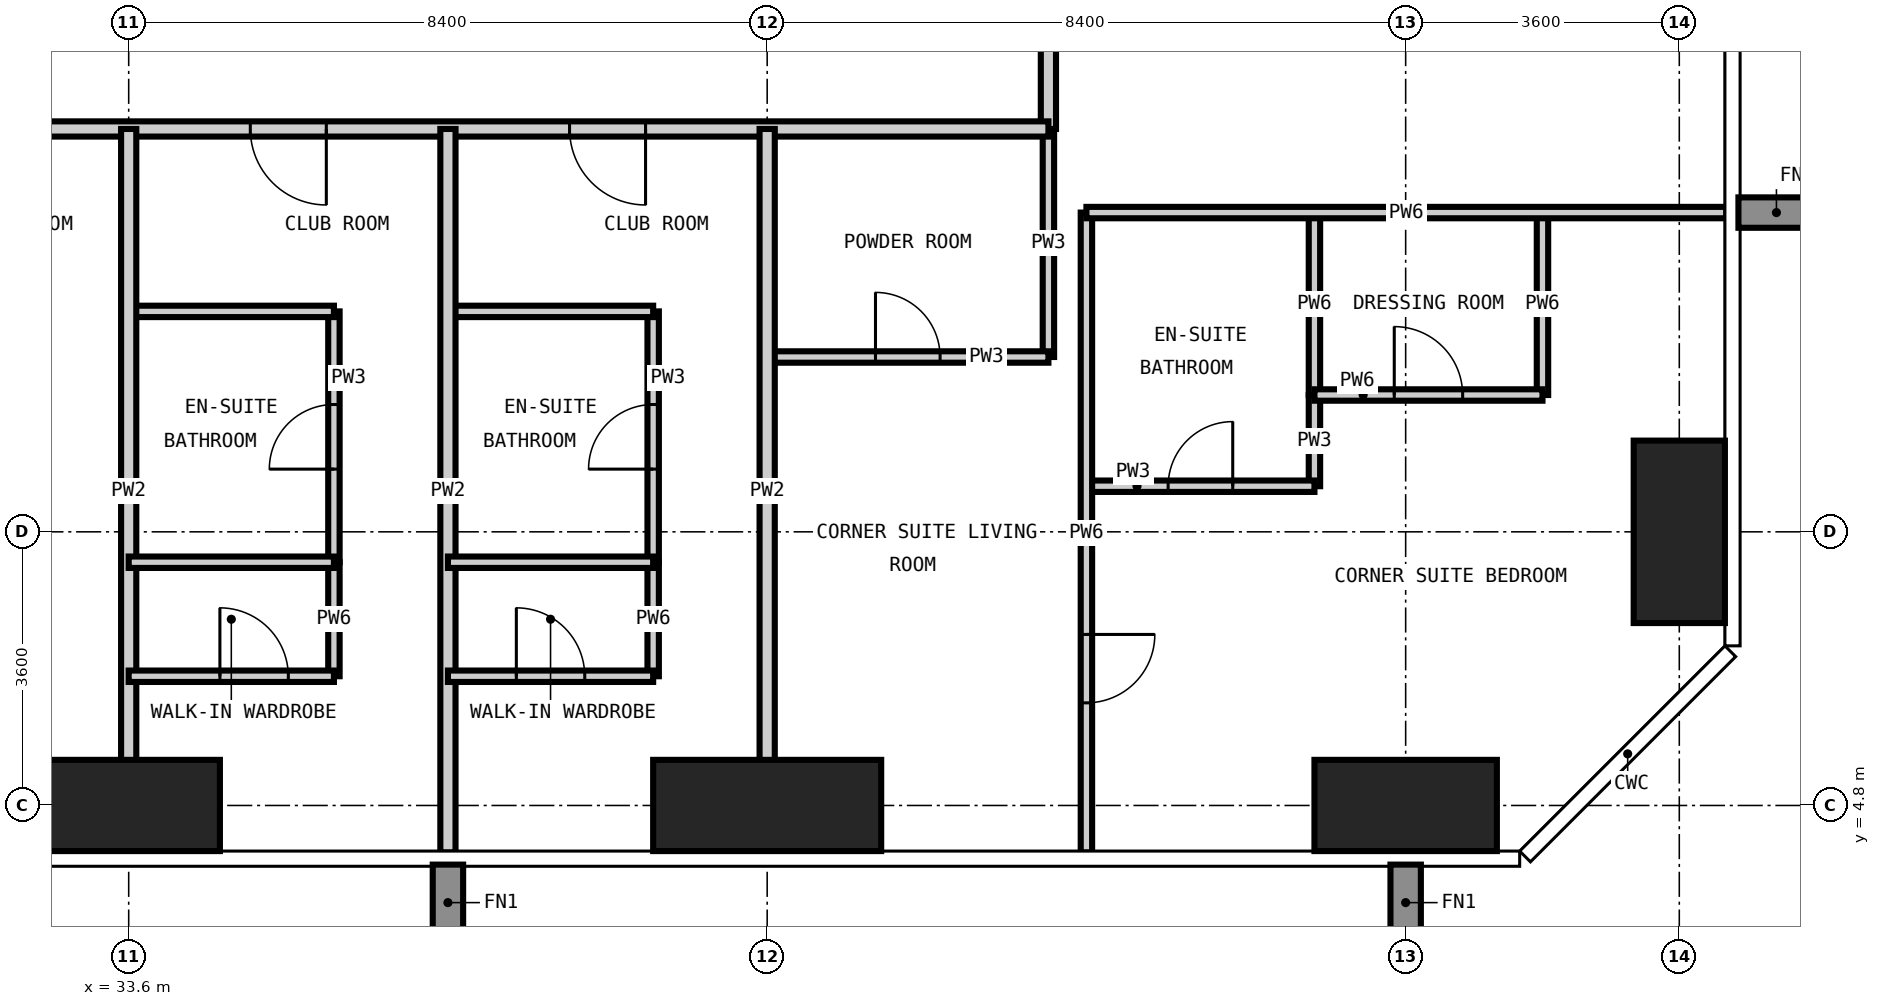
"""IFC4 building model, lengths in metres.
Left out: names, types, materials, properties, quantities, classifications, styles, units other than length and angle.
Written with IfcOpenShell. Run it as: python <this file> out.ifc"""

import sys

from ifc_helpers import new_model, si_unit, direction, frame, frame_2d, origin, origin_2d, place, context, subcontext, project, spatial, rectangle, extrude, element, fill, save


model = new_model("IFC4")
c1 = context("Model", 3, precision=1e-05, world=origin(), true_north=direction((0.0, 1.0)))
c2 = subcontext(c1, "Body", "Model", "MODEL_VIEW")
j1 = project(units=[si_unit("LENGTHUNIT", "METRE"), si_unit("PLANEANGLEUNIT", "RADIAN")], contexts=[c1])
p1 = place(None, origin())
s1 = spatial("IfcSite", under=j1, at=p1, CompositionType="ELEMENT")
p2 = place(p1, origin())
s2 = spatial("IfcBuilding", under=s1, at=p2, CompositionType="ELEMENT")
p3 = place(p2, frame((0.0, 0.0, 213.0)))
s3 = spatial("IfcBuildingStorey", under=s2, at=p3, CompositionType="ELEMENT", Elevation=213.0)
p4 = place(p3, frame((33.6, 4.8, -0.35), z_axis=(0.0, 0.0, 1.0), x_axis=(1.0, 0.0, 0.0)))
e1 = element("IfcColumn", 1, at=p4, inside=s3, PredefinedType="COLUMN", context=c2, shape_type="SweptSolid", body=[
    extrude(rectangle(XDim=2.4, YDim=1.2, at=origin_2d()), origin(), (0.0, 0.0, 1.0), 3.6),
])
p5 = place(p3, frame((42.0, 4.8, -0.35), z_axis=(0.0, 0.0, 1.0), x_axis=(1.0, 0.0, 0.0)))
e2 = element("IfcColumn", 2, at=p5, inside=s3, PredefinedType="COLUMN", context=c2, shape_type="SweptSolid", body=[
    extrude(rectangle(XDim=3.0, YDim=1.2, at=origin_2d()), origin(), (0.0, 0.0, 1.0), 3.6),
])
p6 = place(p3, frame((50.4, 4.8, -0.35), z_axis=(0.0, 0.0, 1.0), x_axis=(1.0, 0.0, 0.0)))
e3 = element("IfcColumn", 3, at=p6, inside=s3, PredefinedType="COLUMN", context=c2, shape_type="SweptSolid", body=[
    extrude(rectangle(XDim=2.4, YDim=1.2, at=origin_2d()), origin(), (0.0, 0.0, 1.0), 3.6),
])
p7 = place(p3, frame((54.0, 8.4, -0.35), z_axis=(0.0, 0.0, 1.0), x_axis=(1.0, 0.0, 0.0)))
e4 = element("IfcColumn", 4, at=p7, inside=s3, PredefinedType="COLUMN", context=c2, shape_type="SweptSolid", body=[
    extrude(rectangle(XDim=1.2, YDim=2.4, at=origin_2d()), origin(), (0.0, 0.0, 1.0), 3.6),
])
p8 = place(p3, frame((36.3, 8.0, 0.0), z_axis=(0.0, 0.0, 1.0), x_axis=(0.0, 1.0, 0.0)))
e5 = element("IfcWall", 5, at=p8, inside=s3, PredefinedType="PARTITIONING", context=c2, shape_type="SweptSolid", body=[
    extrude(rectangle(XDim=3.3, YDim=0.15, at=frame_2d((1.65, 0.0))), origin(), (0.0, 0.0, 1.0), 3.25),
])
p9 = place(p8, frame((1.225, 0.0, 0.0)))
e6 = element("IfcOpeningElement", 6, at=p9, cuts=e5, PredefinedType="OPENING", context=c2, shape_type="SweptSolid", body=[
    extrude(rectangle(XDim=0.85, YDim=2.1, at=frame_2d((0.425, 1.05))), frame((0.0, 0.085, 0.0), z_axis=(0.0, -1.0, 0.0), x_axis=(1.0, 0.0, 0.0)), (0.0, 0.0, 1.0), 0.17),
])
p10 = place(p3, frame((40.5, 8.0, 0.0), z_axis=(0.0, 0.0, 1.0), x_axis=(0.0, 1.0, 0.0)))
e7 = element("IfcWall", 7, at=p10, inside=s3, PredefinedType="PARTITIONING", context=c2, shape_type="SweptSolid", body=[
    extrude(rectangle(XDim=3.3, YDim=0.15, at=frame_2d((1.65, 0.0))), origin(), (0.0, 0.0, 1.0), 3.25),
])
p11 = place(p10, frame((1.225, 0.0, 0.0)))
e8 = element("IfcOpeningElement", 8, at=p11, cuts=e7, PredefinedType="OPENING", context=c2, shape_type="SweptSolid", body=[
    extrude(rectangle(XDim=0.85, YDim=2.1, at=frame_2d((0.425, 1.05))), frame((0.0, 0.085, 0.0), z_axis=(0.0, -1.0, 0.0), x_axis=(1.0, 0.0, 0.0)), (0.0, 0.0, 1.0), 0.17),
])
p12 = place(p3, frame((45.7, 10.7, 0.0), z_axis=(0.0, 0.0, 1.0), x_axis=(0.0, 1.0, 0.0)))
e9 = element("IfcWall", 9, at=p12, inside=s3, PredefinedType="PARTITIONING", context=c2, shape_type="SweptSolid", body=[
    extrude(rectangle(XDim=3.0, YDim=0.15, at=frame_2d((1.5, 0.0))), origin(), (0.0, 0.0, 1.0), 3.25),
])
p13 = place(p3, frame((49.2, 9.0, 0.0), z_axis=(0.0, 0.0, 1.0), x_axis=(0.0, 1.0, 0.0)))
e10 = element("IfcWall", 10, at=p13, inside=s3, PredefinedType="PARTITIONING", context=c2, shape_type="SweptSolid", body=[
    extrude(rectangle(XDim=1.2, YDim=0.15, at=frame_2d((0.6, 0.0))), origin(), (0.0, 0.0, 1.0), 3.25),
])
p14 = place(p3, frame((46.2, 9.0, 0.0), z_axis=(0.0, 0.0, 1.0), x_axis=(1.0, 0.0, 0.0)))
e11 = element("IfcWall", 11, at=p14, inside=s3, PredefinedType="PARTITIONING", context=c2, shape_type="SweptSolid", body=[
    extrude(rectangle(XDim=3.0, YDim=0.15, at=frame_2d((1.5, 0.0))), origin(), (0.0, 0.0, 1.0), 3.25),
])
p15 = place(p14, frame((1.075, 0.0, 0.0)))
e12 = element("IfcOpeningElement", 12, at=p15, cuts=e11, PredefinedType="OPENING", context=c2, shape_type="SweptSolid", body=[
    extrude(rectangle(XDim=0.85, YDim=2.1, at=frame_2d((0.425, 1.05))), frame((0.0, 0.085, 0.0), z_axis=(0.0, -1.0, 0.0), x_axis=(1.0, 0.0, 0.0)), (0.0, 0.0, 1.0), 0.17),
])
p16 = place(p3, frame((42.0, 10.7, 0.0), z_axis=(0.0, 0.0, 1.0), x_axis=(1.0, 0.0, 0.0)))
e13 = element("IfcWall", 13, at=p16, inside=s3, PredefinedType="PARTITIONING", context=c2, shape_type="SweptSolid", body=[
    extrude(rectangle(XDim=3.7, YDim=0.15, at=frame_2d((1.85, 0.0))), origin(), (0.0, 0.0, 1.0), 3.25),
])
p17 = place(p16, frame((1.425, 0.0, 0.0)))
e14 = element("IfcOpeningElement", 14, at=p17, cuts=e13, PredefinedType="OPENING", context=c2, shape_type="SweptSolid", body=[
    extrude(rectangle(XDim=0.85, YDim=2.1, at=frame_2d((0.425, 1.05))), frame((0.0, 0.085, 0.0), z_axis=(0.0, -1.0, 0.0), x_axis=(1.0, 0.0, 0.0)), (0.0, 0.0, 1.0), 0.17),
])
for number, where, z_axis, x_axis in (
    (15, (33.6, 11.3, 0.0), (0.0, 0.0, 1.0), (1.0, 0.0, 0.0)),
    (16, (37.8, 11.3, 0.0), (0.0, 0.0, 1.0), (1.0, 0.0, 0.0)),
):
    element("IfcWall", number, at=place(p3, frame(where, z_axis=z_axis, x_axis=x_axis)), inside=s3, PredefinedType="PARTITIONING", context=c2, shape_type="SweptSolid", body=[
        extrude(rectangle(XDim=2.7, YDim=0.15, at=frame_2d((1.35, 0.0))), origin(), (0.0, 0.0, 1.0), 3.25),
    ])
p18 = place(p3, frame((45.7, 44.5, 0.0), z_axis=(0.0, 0.0, 1.0), x_axis=(0.0, -1.0, 0.0)))
e17 = element("IfcWall", 17, at=p18, inside=s3, PredefinedType="PARTITIONING", context=c2, shape_type="SweptSolid", body=[
    extrude(rectangle(XDim=30.8, YDim=0.2, at=frame_2d((15.4, 0.0))), origin(), (0.0, 0.0, 1.0), 3.25),
])
p19 = place(p18, frame((23.0, 0.0, 0.0)))
e18 = element("IfcOpeningElement", 18, at=p19, cuts=e17, PredefinedType="OPENING", context=c2, shape_type="SweptSolid", body=[
    extrude(rectangle(XDim=1.0, YDim=2.2, at=frame_2d((0.5, 1.1))), frame((0.0, 0.11, 0.0), z_axis=(0.0, -1.0, 0.0), x_axis=(1.0, 0.0, 0.0)), (0.0, 0.0, 1.0), 0.22),
])
p20 = place(p18, frame((14.6, 0.0, 0.0)))
e19 = element("IfcOpeningElement", 19, at=p20, cuts=e17, PredefinedType="OPENING", context=c2, shape_type="SweptSolid", body=[
    extrude(rectangle(XDim=1.0, YDim=2.2, at=frame_2d((0.5, 1.1))), frame((0.0, 0.11, 0.0), z_axis=(0.0, -1.0, 0.0), x_axis=(1.0, 0.0, 0.0)), (0.0, 0.0, 1.0), 0.22),
])
p21 = place(p18, frame((6.2, 0.0, 0.0)))
e20 = element("IfcOpeningElement", 20, at=p21, cuts=e17, PredefinedType="OPENING", context=c2, shape_type="SweptSolid", body=[
    extrude(rectangle(XDim=1.0, YDim=2.2, at=frame_2d((0.5, 1.1))), frame((0.0, 0.11, 0.0), z_axis=(0.0, -1.0, 0.0), x_axis=(1.0, 0.0, 0.0)), (0.0, 0.0, 1.0), 0.22),
])
p22 = place(p18, frame((28.75, 0.0, 0.0)))
e21 = element("IfcOpeningElement", 21, at=p22, cuts=e17, PredefinedType="OPENING", context=c2, shape_type="SweptSolid", body=[
    extrude(rectangle(XDim=1.0, YDim=2.2, at=frame_2d((0.5, 1.1))), frame((0.0, 0.11, 0.0), z_axis=(0.0, -1.0, 0.0), x_axis=(1.0, 0.0, 0.0)), (0.0, 0.0, 1.0), 0.22),
])
p23 = place(p18, frame((0.75, 0.0, 0.0)))
e22 = element("IfcOpeningElement", 22, at=p23, cuts=e17, PredefinedType="OPENING", context=c2, shape_type="SweptSolid", body=[
    extrude(rectangle(XDim=1.0, YDim=2.2, at=frame_2d((0.5, 1.1))), frame((0.0, 0.11, 0.0), z_axis=(0.0, -1.0, 0.0), x_axis=(1.0, 0.0, 0.0)), (0.0, 0.0, 1.0), 0.22),
])
p24 = place(p3, frame((45.7, 13.7, 0.0), z_axis=(0.0, 0.0, 1.0), x_axis=(-1.0, 0.0, 0.0)))
e23 = element("IfcWall", 23, at=p24, inside=s3, PredefinedType="PARTITIONING", context=c2, shape_type="SweptSolid", body=[
    extrude(rectangle(XDim=32.0, YDim=0.2, at=frame_2d((16.0, 0.0))), origin(), (0.0, 0.0, 1.0), 3.25),
])
p25 = place(p24, frame((26.3, 0.0, 0.0)))
e24 = element("IfcOpeningElement", 24, at=p25, cuts=e23, PredefinedType="OPENING", context=c2, shape_type="SweptSolid", body=[
    extrude(rectangle(XDim=1.0, YDim=2.2, at=frame_2d((0.5, 1.1))), frame((0.0, 0.11, 0.0), z_axis=(0.0, -1.0, 0.0), x_axis=(1.0, 0.0, 0.0)), (0.0, 0.0, 1.0), 0.22),
])
p26 = place(p24, frame((22.1, 0.0, 0.0)))
e25 = element("IfcOpeningElement", 25, at=p26, cuts=e23, PredefinedType="OPENING", context=c2, shape_type="SweptSolid", body=[
    extrude(rectangle(XDim=1.0, YDim=2.2, at=frame_2d((0.5, 1.1))), frame((0.0, 0.11, 0.0), z_axis=(0.0, -1.0, 0.0), x_axis=(1.0, 0.0, 0.0)), (0.0, 0.0, 1.0), 0.22),
])
p27 = place(p24, frame((17.9, 0.0, 0.0)))
e26 = element("IfcOpeningElement", 26, at=p27, cuts=e23, PredefinedType="OPENING", context=c2, shape_type="SweptSolid", body=[
    extrude(rectangle(XDim=1.0, YDim=2.2, at=frame_2d((0.5, 1.1))), frame((0.0, 0.11, 0.0), z_axis=(0.0, -1.0, 0.0), x_axis=(1.0, 0.0, 0.0)), (0.0, 0.0, 1.0), 0.22),
])
p28 = place(p24, frame((13.7, 0.0, 0.0)))
e27 = element("IfcOpeningElement", 27, at=p28, cuts=e23, PredefinedType="OPENING", context=c2, shape_type="SweptSolid", body=[
    extrude(rectangle(XDim=1.0, YDim=2.2, at=frame_2d((0.5, 1.1))), frame((0.0, 0.11, 0.0), z_axis=(0.0, -1.0, 0.0), x_axis=(1.0, 0.0, 0.0)), (0.0, 0.0, 1.0), 0.22),
])
p29 = place(p24, frame((9.5, 0.0, 0.0)))
e28 = element("IfcOpeningElement", 28, at=p29, cuts=e23, PredefinedType="OPENING", context=c2, shape_type="SweptSolid", body=[
    extrude(rectangle(XDim=1.0, YDim=2.2, at=frame_2d((0.5, 1.1))), frame((0.0, 0.11, 0.0), z_axis=(0.0, -1.0, 0.0), x_axis=(1.0, 0.0, 0.0)), (0.0, 0.0, 1.0), 0.22),
])
p30 = place(p24, frame((5.3, 0.0, 0.0)))
e29 = element("IfcOpeningElement", 29, at=p30, cuts=e23, PredefinedType="OPENING", context=c2, shape_type="SweptSolid", body=[
    extrude(rectangle(XDim=1.0, YDim=2.2, at=frame_2d((0.5, 1.1))), frame((0.0, 0.11, 0.0), z_axis=(0.0, -1.0, 0.0), x_axis=(1.0, 0.0, 0.0)), (0.0, 0.0, 1.0), 0.22),
])
for number, where, z_axis, x_axis in (
    (30, (33.6, 4.182, 0.0), (0.0, 0.0, 1.0), (0.0, 1.0, 0.0)),
    (31, (37.8, 4.182, 0.0), (0.0, 0.0, 1.0), (0.0, 1.0, 0.0)),
    (32, (42.0, 4.182, 0.0), (0.0, 0.0, 1.0), (0.0, 1.0, 0.0)),
):
    element("IfcWall", number, at=place(p3, frame(where, z_axis=z_axis, x_axis=x_axis)), inside=s3, PredefinedType="PARTITIONING", context=c2, shape_type="SweptSolid", body=[
        extrude(rectangle(XDim=9.518, YDim=0.2, at=frame_2d((4.759, 0.0))), origin(), (0.0, 0.0, 1.0), 3.25),
    ])
for number, where, z_axis, x_axis in (
    (33, (36.3, 6.5, 0.0), (0.0, 0.0, 1.0), (0.0, 1.0, 0.0)),
    (34, (40.5, 6.5, 0.0), (0.0, 0.0, 1.0), (0.0, 1.0, 0.0)),
):
    element("IfcWall", number, at=place(p3, frame(where, z_axis=z_axis, x_axis=x_axis)), inside=s3, PredefinedType="PARTITIONING", context=c2, shape_type="SweptSolid", body=[
        extrude(rectangle(XDim=1.5, YDim=0.15, at=frame_2d((0.75, 0.0))), origin(), (0.0, 0.0, 1.0), 3.25),
    ])
p31 = place(p3, frame((46.2, 4.182, 0.0), z_axis=(0.0, 0.0, 1.0), x_axis=(0.0, 1.0, 0.0)))
e35 = element("IfcWall", 35, at=p31, inside=s3, PredefinedType="PARTITIONING", context=c2, shape_type="SweptSolid", body=[
    extrude(rectangle(XDim=8.418, YDim=0.15, at=frame_2d((4.209, 0.0))), origin(), (0.0, 0.0, 1.0), 3.25),
])
p32 = place(p31, frame((1.968, 0.0, 0.0)))
e36 = element("IfcOpeningElement", 36, at=p32, cuts=e35, PredefinedType="OPENING", context=c2, shape_type="SweptSolid", body=[
    extrude(rectangle(XDim=0.9, YDim=2.1, at=frame_2d((0.45, 1.05))), frame((0.0, 0.085, 0.0), z_axis=(0.0, -1.0, 0.0), x_axis=(1.0, 0.0, 0.0)), (0.0, 0.0, 1.0), 0.17),
])
for number, where, z_axis, x_axis in (
    (37, (49.2, 10.2, 0.0), (0.0, 0.0, 1.0), (0.0, 1.0, 0.0)),
    (38, (52.2, 10.2, 0.0), (0.0, 0.0, 1.0), (0.0, 1.0, 0.0)),
):
    element("IfcWall", number, at=place(p3, frame(where, z_axis=z_axis, x_axis=x_axis)), inside=s3, PredefinedType="PARTITIONING", context=c2, shape_type="SweptSolid", body=[
        extrude(rectangle(XDim=2.4, YDim=0.15, at=frame_2d((1.2, 0.0))), origin(), (0.0, 0.0, 1.0), 3.25),
    ])
p33 = place(p3, frame((33.6, 6.5, 0.0), z_axis=(0.0, 0.0, 1.0), x_axis=(1.0, 0.0, 0.0)))
e39 = element("IfcWall", 39, at=p33, inside=s3, PredefinedType="PARTITIONING", context=c2, shape_type="SweptSolid", body=[
    extrude(rectangle(XDim=2.7, YDim=0.15, at=frame_2d((1.35, 0.0))), origin(), (0.0, 0.0, 1.0), 3.25),
])
p34 = place(p33, frame((1.2, 0.0, 0.0)))
e40 = element("IfcOpeningElement", 40, at=p34, cuts=e39, PredefinedType="OPENING", context=c2, shape_type="SweptSolid", body=[
    extrude(rectangle(XDim=0.9, YDim=2.1, at=frame_2d((0.45, 1.05))), frame((0.0, 0.085, 0.0), z_axis=(0.0, -1.0, 0.0), x_axis=(1.0, 0.0, 0.0)), (0.0, 0.0, 1.0), 0.17),
])
p35 = place(p3, frame((37.8, 6.5, 0.0), z_axis=(0.0, 0.0, 1.0), x_axis=(1.0, 0.0, 0.0)))
e41 = element("IfcWall", 41, at=p35, inside=s3, PredefinedType="PARTITIONING", context=c2, shape_type="SweptSolid", body=[
    extrude(rectangle(XDim=2.7, YDim=0.15, at=frame_2d((1.35, 0.0))), origin(), (0.0, 0.0, 1.0), 3.25),
])
p36 = place(p35, frame((0.9, 0.0, 0.0)))
e42 = element("IfcOpeningElement", 42, at=p36, cuts=e41, PredefinedType="OPENING", context=c2, shape_type="SweptSolid", body=[
    extrude(rectangle(XDim=0.9, YDim=2.1, at=frame_2d((0.45, 1.05))), frame((0.0, 0.085, 0.0), z_axis=(0.0, -1.0, 0.0), x_axis=(1.0, 0.0, 0.0)), (0.0, 0.0, 1.0), 0.17),
])
for number, where, z_axis, x_axis in (
    (43, (33.6, 8.0, 0.0), (0.0, 0.0, 1.0), (1.0, 0.0, 0.0)),
    (44, (37.8, 8.0, 0.0), (0.0, 0.0, 1.0), (1.0, 0.0, 0.0)),
):
    element("IfcWall", number, at=place(p3, frame(where, z_axis=z_axis, x_axis=x_axis)), inside=s3, PredefinedType="PARTITIONING", context=c2, shape_type="SweptSolid", body=[
        extrude(rectangle(XDim=2.7, YDim=0.15, at=frame_2d((1.35, 0.0))), origin(), (0.0, 0.0, 1.0), 3.25),
    ])
p37 = place(p3, frame((49.2, 10.2, 0.0), z_axis=(0.0, 0.0, 1.0), x_axis=(1.0, 0.0, 0.0)))
e45 = element("IfcWall", 45, at=p37, inside=s3, PredefinedType="PARTITIONING", context=c2, shape_type="SweptSolid", body=[
    extrude(rectangle(XDim=3.0, YDim=0.15, at=frame_2d((1.5, 0.0))), origin(), (0.0, 0.0, 1.0), 3.25),
])
p38 = place(p37, frame((1.05, 0.0, 0.0)))
e46 = element("IfcOpeningElement", 46, at=p38, cuts=e45, PredefinedType="OPENING", context=c2, shape_type="SweptSolid", body=[
    extrude(rectangle(XDim=0.9, YDim=2.1, at=frame_2d((0.45, 1.05))), frame((0.0, 0.085, 0.0), z_axis=(0.0, -1.0, 0.0), x_axis=(1.0, 0.0, 0.0)), (0.0, 0.0, 1.0), 0.17),
])
p39 = place(p3, frame((46.2, 12.6, 0.0), z_axis=(0.0, 0.0, 1.0), x_axis=(1.0, 0.0, 0.0)))
e47 = element("IfcWall", 47, at=p39, inside=s3, PredefinedType="PARTITIONING", context=c2, shape_type="SweptSolid", body=[
    extrude(rectangle(XDim=8.418, YDim=0.15, at=frame_2d((4.209, 0.0))), origin(), (0.0, 0.0, 1.0), 3.25),
])
p40 = place(p29, origin())
e48 = element("IfcDoor", 48, at=p40, inside=s3, OperationType="SINGLE_SWING_LEFT", PredefinedType="DOOR", context=c2, shape_type="SweptSolid", body=[
    extrude(rectangle(XDim=1.0, YDim=2.2, at=frame_2d((0.5, 1.1))), frame((0.0, 0.025, 0.0), z_axis=(0.0, -1.0, 0.0), x_axis=(1.0, 0.0, 0.0)), (0.0, 0.0, 1.0), 0.05),
])
fill(e28, e48)
p41 = place(p9, origin())
e49 = element("IfcDoor", 49, at=p41, inside=s3, OperationType="SINGLE_SWING_LEFT", PredefinedType="DOOR", context=c2, shape_type="SweptSolid", body=[
    extrude(rectangle(XDim=0.85, YDim=2.1, at=frame_2d((0.425, 1.05))), frame((0.0, 0.025, 0.0), z_axis=(0.0, -1.0, 0.0), x_axis=(1.0, 0.0, 0.0)), (0.0, 0.0, 1.0), 0.05),
])
fill(e6, e49)
p42 = place(p34, origin())
e50 = element("IfcDoor", 50, at=p42, inside=s3, OperationType="SINGLE_SWING_LEFT", PredefinedType="DOOR", context=c2, shape_type="SweptSolid", body=[
    extrude(rectangle(XDim=0.9, YDim=2.1, at=frame_2d((0.45, 1.05))), frame((0.0, 0.025, 0.0), z_axis=(0.0, -1.0, 0.0), x_axis=(1.0, 0.0, 0.0)), (0.0, 0.0, 1.0), 0.05),
])
fill(e40, e50)
p43 = place(p30, origin())
e51 = element("IfcDoor", 51, at=p43, inside=s3, OperationType="SINGLE_SWING_LEFT", PredefinedType="DOOR", context=c2, shape_type="SweptSolid", body=[
    extrude(rectangle(XDim=1.0, YDim=2.2, at=frame_2d((0.5, 1.1))), frame((0.0, 0.025, 0.0), z_axis=(0.0, -1.0, 0.0), x_axis=(1.0, 0.0, 0.0)), (0.0, 0.0, 1.0), 0.05),
])
fill(e29, e51)
p44 = place(p11, origin())
e52 = element("IfcDoor", 52, at=p44, inside=s3, OperationType="SINGLE_SWING_LEFT", PredefinedType="DOOR", context=c2, shape_type="SweptSolid", body=[
    extrude(rectangle(XDim=0.85, YDim=2.1, at=frame_2d((0.425, 1.05))), frame((0.0, 0.025, 0.0), z_axis=(0.0, -1.0, 0.0), x_axis=(1.0, 0.0, 0.0)), (0.0, 0.0, 1.0), 0.05),
])
fill(e8, e52)
p45 = place(p36, origin())
e53 = element("IfcDoor", 53, at=p45, inside=s3, OperationType="SINGLE_SWING_LEFT", PredefinedType="DOOR", context=c2, shape_type="SweptSolid", body=[
    extrude(rectangle(XDim=0.9, YDim=2.1, at=frame_2d((0.45, 1.05))), frame((0.0, 0.025, 0.0), z_axis=(0.0, -1.0, 0.0), x_axis=(1.0, 0.0, 0.0)), (0.0, 0.0, 1.0), 0.05),
])
fill(e42, e53)
p46 = place(p17, origin())
e54 = element("IfcDoor", 54, at=p46, inside=s3, OperationType="SINGLE_SWING_LEFT", PredefinedType="DOOR", context=c2, shape_type="SweptSolid", body=[
    extrude(rectangle(XDim=0.85, YDim=2.1, at=frame_2d((0.425, 1.05))), frame((0.0, 0.025, 0.0), z_axis=(0.0, -1.0, 0.0), x_axis=(1.0, 0.0, 0.0)), (0.0, 0.0, 1.0), 0.05),
])
fill(e14, e54)
p47 = place(p32, frame((0.9, 0.0, 0.0), z_axis=(0.0, 0.0, 1.0), x_axis=(-1.0, 0.0, 0.0)))
e55 = element("IfcDoor", 55, at=p47, inside=s3, OperationType="SINGLE_SWING_LEFT", PredefinedType="DOOR", context=c2, shape_type="SweptSolid", body=[
    extrude(rectangle(XDim=0.9, YDim=2.1, at=frame_2d((0.45, 1.05))), frame((0.0, 0.025, 0.0), z_axis=(0.0, -1.0, 0.0), x_axis=(1.0, 0.0, 0.0)), (0.0, 0.0, 1.0), 0.05),
])
fill(e36, e55)
p48 = place(p15, origin())
e56 = element("IfcDoor", 56, at=p48, inside=s3, OperationType="SINGLE_SWING_RIGHT", PredefinedType="DOOR", context=c2, shape_type="SweptSolid", body=[
    extrude(rectangle(XDim=0.85, YDim=2.1, at=frame_2d((0.425, 1.05))), frame((0.0, 0.025, 0.0), z_axis=(0.0, -1.0, 0.0), x_axis=(1.0, 0.0, 0.0)), (0.0, 0.0, 1.0), 0.05),
])
fill(e12, e56)
p49 = place(p38, origin())
e57 = element("IfcDoor", 57, at=p49, inside=s3, OperationType="SINGLE_SWING_LEFT", PredefinedType="DOOR", context=c2, shape_type="SweptSolid", body=[
    extrude(rectangle(XDim=0.9, YDim=2.1, at=frame_2d((0.45, 1.05))), frame((0.0, 0.025, 0.0), z_axis=(0.0, -1.0, 0.0), x_axis=(1.0, 0.0, 0.0)), (0.0, 0.0, 1.0), 0.05),
])
fill(e46, e57)
save(model, sys.argv[1])
